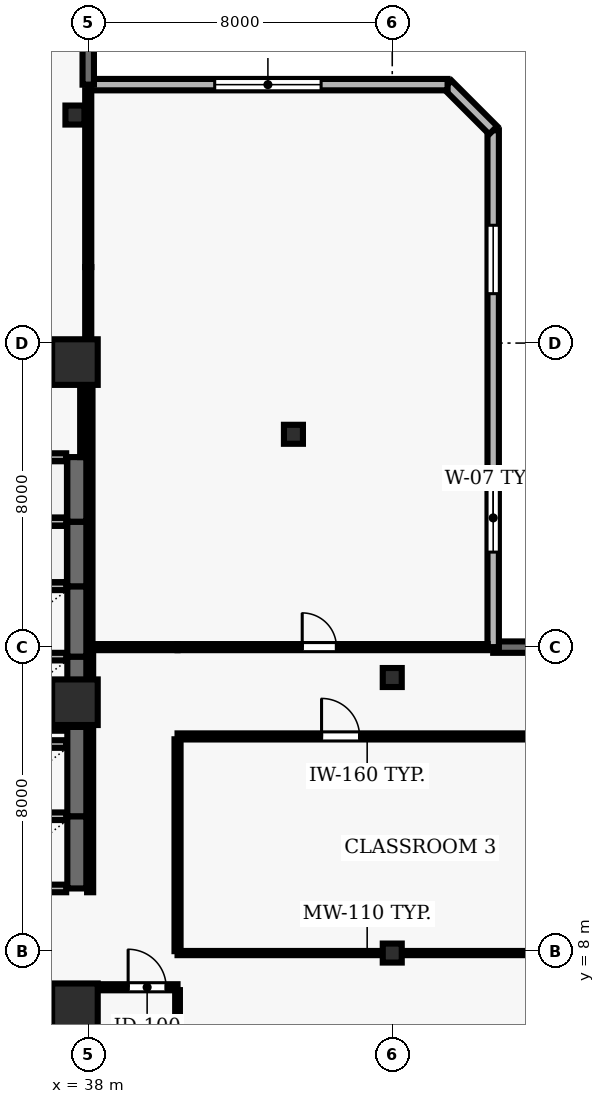
"""IFC4 building model, lengths in metres.
Left out: names, types, materials, properties, quantities, classifications, styles, units other than length and angle.
Written with IfcOpenShell. Run it as: python <this file> out.ifc"""

import sys

from ifc_helpers import new_model, si_unit, direction, frame, frame_2d, origin, origin_2d, place, context, subcontext, project, spatial, rectangle, hollow_rectangle, extrude, element, fill, save


model = new_model("IFC4")
c1 = context("Model", 3, precision=1e-05, world=origin(), true_north=direction((0.0, 1.0)))
c2 = subcontext(c1, "Body", "Model", "MODEL_VIEW")
j1 = project(units=[si_unit("LENGTHUNIT", "METRE"), si_unit("PLANEANGLEUNIT", "RADIAN")], contexts=[c1])
p1 = place(None, origin())
s1 = spatial("IfcSite", under=j1, at=p1, CompositionType="ELEMENT")
p2 = place(p1, origin())
s2 = spatial("IfcBuilding", under=s1, at=p2, CompositionType="ELEMENT")
p3 = place(p2, frame((0.0, 0.0, 107.3)))
s3 = spatial("IfcBuildingStorey", under=s2, at=p3, CompositionType="ELEMENT", Elevation=107.3)
for number, where, z_axis, x_axis in (
    (1, (37.65, 6.55, 0.0), (0.0, 0.0, 1.0), (1.0, 0.0, 0.0)),
    (2, (37.65, 14.55, 0.0), (0.0, 0.0, 1.0), (1.0, 0.0, 0.0)),
    (3, (37.65, 23.5, 0.0), (0.0, 0.0, 1.0), (1.0, 0.0, 0.0)),
):
    element("IfcColumn", number, at=place(p3, frame(where, z_axis=z_axis, x_axis=x_axis)), inside=s3, PredefinedType="COLUMN", context=c2, shape_type="SweptSolid", body=[
        extrude(rectangle(XDim=1.2, YDim=1.2, at=origin_2d()), origin(), (0.0, 0.0, 1.0), 3.9),
    ])
for number, where, z_axis, x_axis in (
    (4, (46.0, 7.95, 0.0), (0.0, 0.0, 1.0), (1.0, 0.0, 0.0)),
    (5, (46.0, 15.2, 0.0), (0.0, 0.0, 1.0), (1.0, 0.0, 0.0)),
    (6, (37.65, 30.0, 0.0), (0.0, 0.0, 1.0), (1.0, 0.0, 0.0)),
    (7, (43.4, 21.6, 0.0), (0.0, 0.0, 1.0), (1.0, 0.0, 0.0)),
):
    element("IfcColumn", number, at=place(p3, frame(where, z_axis=z_axis, x_axis=x_axis)), inside=s3, PredefinedType="COLUMN", context=c2, shape_type="SweptSolid", body=[
        extrude(hollow_rectangle(XDim=0.5, YDim=0.5, WallThickness=0.025, at=origin_2d()), origin(), (0.0, 0.0, 1.0), 3.9),
    ])
p4 = place(p3, frame((68.1, 16.0, 0.0), z_axis=(0.0, 0.0, 1.0), x_axis=(-1.0, 0.0, 0.0)))
e8 = element("IfcWall", 8, at=p4, inside=s3, PredefinedType="SOLIDWALL", context=c2, shape_type="SweptSolid", body=[
    extrude(rectangle(XDim=19.444, YDim=0.3, at=frame_2d((9.722, 0.0))), origin(), (0.0, 0.0, 1.0), 3.69),
])
p5 = place(p4, frame((6.922, 0.0, 0.0)))
e9 = element("IfcOpeningElement", 9, at=p5, cuts=e8, PredefinedType="OPENING", context=c2, shape_type="SweptSolid", body=[
    extrude(rectangle(XDim=1.0, YDim=2.2, at=frame_2d((0.5, 1.1))), frame((0.0, 0.16, 0.0), z_axis=(0.0, -1.0, 0.0), x_axis=(1.0, 0.0, 0.0)), (0.0, 0.0, 1.0), 0.32),
])
p6 = place(p4, frame((2.491, 0.0, 0.9)))
e10 = element("IfcOpeningElement", 10, at=p6, cuts=e8, PredefinedType="OPENING", context=c2, shape_type="SweptSolid", body=[
    extrude(rectangle(XDim=1.5, YDim=1.8, at=frame_2d((0.75, 0.9))), frame((0.0, 0.16, 0.0), z_axis=(0.0, -1.0, 0.0), x_axis=(1.0, 0.0, 0.0)), (0.0, 0.0, 1.0), 0.32),
])
p7 = place(p4, frame((8.972, 0.0, 0.9)))
e11 = element("IfcOpeningElement", 11, at=p7, cuts=e8, PredefinedType="OPENING", context=c2, shape_type="SweptSolid", body=[
    extrude(rectangle(XDim=1.5, YDim=1.8, at=frame_2d((0.75, 0.9))), frame((0.0, 0.16, 0.0), z_axis=(0.0, -1.0, 0.0), x_axis=(1.0, 0.0, 0.0)), (0.0, 0.0, 1.0), 0.32),
])
p8 = place(p4, frame((15.453, 0.0, 0.9)))
e12 = element("IfcOpeningElement", 12, at=p8, cuts=e8, PredefinedType="OPENING", context=c2, shape_type="SweptSolid", body=[
    extrude(rectangle(XDim=1.5, YDim=1.8, at=frame_2d((0.75, 0.9))), frame((0.0, 0.16, 0.0), z_axis=(0.0, -1.0, 0.0), x_axis=(1.0, 0.0, 0.0)), (0.0, 0.0, 1.0), 0.32),
])
p9 = place(p3, frame((48.656, 16.0, 0.0), z_axis=(0.0, 0.0, 1.0), x_axis=(0.0, 1.0, 0.0)))
e13 = element("IfcWall", 13, at=p9, inside=s3, PredefinedType="SOLIDWALL", context=c2, shape_type="SweptSolid", body=[
    extrude(rectangle(XDim=13.6, YDim=0.3, at=frame_2d((6.8, 0.0))), origin(), (0.0, 0.0, 1.0), 3.69),
])
p10 = place(p9, frame((2.5, 0.0, 0.9)))
e14 = element("IfcOpeningElement", 14, at=p10, cuts=e13, PredefinedType="OPENING", context=c2, shape_type="SweptSolid", body=[
    extrude(rectangle(XDim=1.8, YDim=1.8, at=frame_2d((0.9, 0.9))), frame((0.0, 0.16, 0.0), z_axis=(0.0, -1.0, 0.0), x_axis=(1.0, 0.0, 0.0)), (0.0, 0.0, 1.0), 0.32),
])
p11 = place(p9, frame((9.3, 0.0, 0.9)))
e15 = element("IfcOpeningElement", 15, at=p11, cuts=e13, PredefinedType="OPENING", context=c2, shape_type="SweptSolid", body=[
    extrude(rectangle(XDim=1.8, YDim=1.8, at=frame_2d((0.9, 0.9))), frame((0.0, 0.16, 0.0), z_axis=(0.0, -1.0, 0.0), x_axis=(1.0, 0.0, 0.0)), (0.0, 0.0, 1.0), 0.32),
])
p12 = place(p3, frame((48.656, 29.6, 0.0), z_axis=(0.0, 0.0, 1.0), x_axis=(-0.707106781187, 0.707106781187, 0.0)))
e16 = element("IfcWall", 16, at=p12, inside=s3, PredefinedType="SOLIDWALL", context=c2, shape_type="SweptSolid", body=[
    extrude(rectangle(XDim=1.697, YDim=0.3, at=frame_2d((0.849, 0.0))), origin(), (0.0, 0.0, 1.0), 3.69),
])
p13 = place(p3, frame((47.456, 30.8, 0.0), z_axis=(0.0, 0.0, 1.0), x_axis=(-1.0, 0.0, 0.0)))
e17 = element("IfcWall", 17, at=p13, inside=s3, PredefinedType="SOLIDWALL", context=c2, shape_type="SweptSolid", body=[
    extrude(rectangle(XDim=9.456, YDim=0.3, at=frame_2d((4.728, 0.0))), origin(), (0.0, 0.0, 1.0), 3.69),
])
p14 = place(p13, frame((3.328, 0.0, 0.9)))
e18 = element("IfcOpeningElement", 18, at=p14, cuts=e17, PredefinedType="OPENING", context=c2, shape_type="SweptSolid", body=[
    extrude(rectangle(XDim=2.8, YDim=1.8, at=frame_2d((1.4, 0.9))), frame((0.0, 0.16, 0.0), z_axis=(0.0, -1.0, 0.0), x_axis=(1.0, 0.0, 0.0)), (0.0, 0.0, 1.0), 0.32),
])
p15 = place(p3, frame((38.0, 30.8, 0.0), z_axis=(0.0, 0.0, 1.0), x_axis=(0.0, 1.0, 0.0)))
e19 = element("IfcWall", 19, at=p15, inside=s3, PredefinedType="SOLIDWALL", context=c2, shape_type="SweptSolid", body=[
    extrude(rectangle(XDim=15.3, YDim=0.3, at=frame_2d((7.65, 0.0))), origin(), (0.0, 0.0, 1.0), 3.69),
])
p16 = place(p15, frame((7.25, 0.0, 0.0)))
e20 = element("IfcOpeningElement", 20, at=p16, cuts=e19, PredefinedType="OPENING", context=c2, shape_type="SweptSolid", body=[
    extrude(rectangle(XDim=1.0, YDim=2.2, at=frame_2d((0.5, 1.1))), frame((0.0, 0.16, 0.0), z_axis=(0.0, -1.0, 0.0), x_axis=(1.0, 0.0, 0.0)), (0.0, 0.0, 1.0), 0.32),
])
p17 = place(p15, frame((2.475, 0.0, 0.9)))
e21 = element("IfcOpeningElement", 21, at=p17, cuts=e19, PredefinedType="OPENING", context=c2, shape_type="SweptSolid", body=[
    extrude(rectangle(XDim=1.8, YDim=2.2, at=frame_2d((0.9, 1.1))), frame((0.0, 0.16, 0.0), z_axis=(0.0, -1.0, 0.0), x_axis=(1.0, 0.0, 0.0)), (0.0, 0.0, 1.0), 0.32),
])
p18 = place(p15, frame((11.025, 0.0, 0.9)))
e22 = element("IfcOpeningElement", 22, at=p18, cuts=e19, PredefinedType="OPENING", context=c2, shape_type="SweptSolid", body=[
    extrude(rectangle(XDim=1.8, YDim=2.2, at=frame_2d((0.9, 1.1))), frame((0.0, 0.16, 0.0), z_axis=(0.0, -1.0, 0.0), x_axis=(1.0, 0.0, 0.0)), (0.0, 0.0, 1.0), 0.32),
])
p19 = place(p3, frame((37.7, 4.7, 0.0), z_axis=(0.0, 0.0, 1.0), x_axis=(0.0, 1.0, 0.0)))
e23 = element("IfcWall", 23, at=p19, inside=s3, PredefinedType="SHEAR", context=c2, shape_type="SweptSolid", body=[
    extrude(rectangle(XDim=2.25, YDim=0.5, at=frame_2d((1.125, 0.0))), origin(), (0.0, 0.0, 1.0), 3.69),
])
p20 = place(p3, frame((37.42, 6.95, 0.0), z_axis=(0.0, 0.0, 1.0), x_axis=(-1.0, 0.0, 0.0)))
e24 = element("IfcWall", 24, at=p20, inside=s3, PredefinedType="SOLIDWALL", context=c2, shape_type="SweptSolid", body=[
    extrude(rectangle(XDim=2.14, YDim=0.2, at=frame_2d((1.07, 0.0))), origin(), (0.0, 0.0, 1.0), 3.69),
])
p21 = place(p3, frame((37.7, 9.65, 0.0), z_axis=(0.0, 0.0, 1.0), x_axis=(0.0, 1.0, 0.0)))
e25 = element("IfcWall", 25, at=p21, inside=s3, PredefinedType="SHEAR", context=c2, shape_type="SweptSolid", body=[
    extrude(rectangle(XDim=1.9, YDim=0.5, at=frame_2d((0.95, 0.0))), origin(), (0.0, 0.0, 1.0), 3.69),
])
for number, where, z_axis, x_axis in (
    (26, (35.28, 9.65, 0.0), (0.0, 0.0, 1.0), (1.0, 0.0, 0.0)),
    (27, (37.42, 11.55, 0.0), (0.0, 0.0, 1.0), (-1.0, 0.0, 0.0)),
):
    element("IfcWall", number, at=place(p3, frame(where, z_axis=z_axis, x_axis=x_axis)), inside=s3, PredefinedType="SOLIDWALL", context=c2, shape_type="SweptSolid", body=[
        extrude(rectangle(XDim=2.14, YDim=0.2, at=frame_2d((1.07, 0.0))), origin(), (0.0, 0.0, 1.0), 3.69),
    ])
p22 = place(p3, frame((37.7, 11.55, 0.0), z_axis=(0.0, 0.0, 1.0), x_axis=(0.0, 1.0, 0.0)))
e28 = element("IfcWall", 28, at=p22, inside=s3, PredefinedType="SHEAR", context=c2, shape_type="SweptSolid", body=[
    extrude(rectangle(XDim=2.35, YDim=0.5, at=frame_2d((1.175, 0.0))), origin(), (0.0, 0.0, 1.0), 3.69),
])
p23 = place(p3, frame((37.42, 13.45, 0.0), z_axis=(0.0, 0.0, 1.0), x_axis=(-1.0, 0.0, 0.0)))
e29 = element("IfcWall", 29, at=p23, inside=s3, PredefinedType="SOLIDWALL", context=c2, shape_type="SweptSolid", body=[
    extrude(rectangle(XDim=2.14, YDim=0.2, at=frame_2d((1.07, 0.0))), origin(), (0.0, 0.0, 1.0), 3.69),
])
p24 = place(p3, frame((37.7, 13.9, 0.0), z_axis=(0.0, 0.0, 1.0), x_axis=(0.0, 1.0, 0.0)))
e30 = element("IfcWall", 30, at=p24, inside=s3, PredefinedType="SHEAR", context=c2, shape_type="SweptSolid", body=[
    extrude(rectangle(XDim=1.85, YDim=0.5, at=frame_2d((0.925, 0.0))), origin(), (0.0, 0.0, 1.0), 3.69),
])
for number, where, z_axis, x_axis in (
    (31, (35.28, 13.9, 0.0), (0.0, 0.0, 1.0), (1.0, 0.0, 0.0)),
    (32, (37.42, 15.75, 0.0), (0.0, 0.0, 1.0), (-1.0, 0.0, 0.0)),
):
    element("IfcWall", number, at=place(p3, frame(where, z_axis=z_axis, x_axis=x_axis)), inside=s3, PredefinedType="SOLIDWALL", context=c2, shape_type="SweptSolid", body=[
        extrude(rectangle(XDim=2.14, YDim=0.2, at=frame_2d((1.07, 0.0))), origin(), (0.0, 0.0, 1.0), 3.69),
    ])
p25 = place(p3, frame((37.7, 15.75, 0.0), z_axis=(0.0, 0.0, 1.0), x_axis=(0.0, 1.0, 0.0)))
e33 = element("IfcWall", 33, at=p25, inside=s3, PredefinedType="SHEAR", context=c2, shape_type="SweptSolid", body=[
    extrude(rectangle(XDim=1.85, YDim=0.5, at=frame_2d((0.925, 0.0))), origin(), (0.0, 0.0, 1.0), 3.69),
])
p26 = place(p3, frame((37.42, 17.6, 0.0), z_axis=(0.0, 0.0, 1.0), x_axis=(-1.0, 0.0, 0.0)))
e34 = element("IfcWall", 34, at=p26, inside=s3, PredefinedType="SOLIDWALL", context=c2, shape_type="SweptSolid", body=[
    extrude(rectangle(XDim=2.14, YDim=0.2, at=frame_2d((1.07, 0.0))), origin(), (0.0, 0.0, 1.0), 3.69),
])
p27 = place(p3, frame((37.7, 17.6, 0.0), z_axis=(0.0, 0.0, 1.0), x_axis=(0.0, 1.0, 0.0)))
e35 = element("IfcWall", 35, at=p27, inside=s3, PredefinedType="SHEAR", context=c2, shape_type="SweptSolid", body=[
    extrude(rectangle(XDim=1.7, YDim=0.5, at=frame_2d((0.85, 0.0))), origin(), (0.0, 0.0, 1.0), 3.69),
])
p28 = place(p3, frame((37.42, 19.3, 0.0), z_axis=(0.0, 0.0, 1.0), x_axis=(-1.0, 0.0, 0.0)))
e36 = element("IfcWall", 36, at=p28, inside=s3, PredefinedType="SOLIDWALL", context=c2, shape_type="SweptSolid", body=[
    extrude(rectangle(XDim=2.14, YDim=0.2, at=frame_2d((1.07, 0.0))), origin(), (0.0, 0.0, 1.0), 3.69),
])
p29 = place(p3, frame((37.7, 19.3, 0.0), z_axis=(0.0, 0.0, 1.0), x_axis=(0.0, 1.0, 0.0)))
e37 = element("IfcWall", 37, at=p29, inside=s3, PredefinedType="SHEAR", context=c2, shape_type="SweptSolid", body=[
    extrude(rectangle(XDim=1.7, YDim=0.5, at=frame_2d((0.85, 0.0))), origin(), (0.0, 0.0, 1.0), 3.69),
])
p30 = place(p3, frame((37.42, 21.0, 0.0), z_axis=(0.0, 0.0, 1.0), x_axis=(-1.0, 0.0, 0.0)))
e38 = element("IfcWall", 38, at=p30, inside=s3, PredefinedType="SOLIDWALL", context=c2, shape_type="SweptSolid", body=[
    extrude(rectangle(XDim=2.14, YDim=0.2, at=frame_2d((1.07, 0.0))), origin(), (0.0, 0.0, 1.0), 3.69),
])
p31 = place(p3, frame((37.85, 23.85, 0.0), z_axis=(0.0, 0.0, 1.0), x_axis=(-1.0, 0.0, 0.0)))
e39 = element("IfcWall", 39, at=p31, inside=s3, PredefinedType="PARTITIONING", context=c2, shape_type="SweptSolid", body=[
    extrude(rectangle(XDim=2.0, YDim=0.16, at=frame_2d((1.0, 0.0))), origin(), (0.0, 0.0, 1.0), 3.073),
])
p32 = place(p3, frame((38.05, 7.05, 0.0), z_axis=(0.0, 0.0, 1.0), x_axis=(1.0, 0.0, 0.0)))
e40 = element("IfcWall", 40, at=p32, inside=s3, PredefinedType="PARTITIONING", context=c2, shape_type="SweptSolid", body=[
    extrude(rectangle(XDim=2.3, YDim=0.16, at=frame_2d((1.15, 0.0))), origin(), (0.0, 0.0, 1.0), 3.69),
])
p33 = place(p32, frame((1.0, 0.0, 0.0)))
e41 = element("IfcOpeningElement", 41, at=p33, cuts=e40, PredefinedType="OPENING", context=c2, shape_type="SweptSolid", body=[
    extrude(rectangle(XDim=1.0, YDim=2.1, at=frame_2d((0.5, 1.05))), frame((0.0, 0.09, 0.0), z_axis=(0.0, -1.0, 0.0), x_axis=(1.0, 0.0, 0.0)), (0.0, 0.0, 1.0), 0.18),
])
p34 = place(p3, frame((40.35, 13.65, 0.0), z_axis=(0.0, 0.0, 1.0), x_axis=(1.0, 0.0, 0.0)))
e42 = element("IfcWall", 42, at=p34, inside=s3, PredefinedType="PARTITIONING", context=c2, shape_type="SweptSolid", body=[
    extrude(rectangle(XDim=9.98, YDim=0.16, at=frame_2d((4.99, 0.0))), origin(), (0.0, 0.0, 1.0), 3.69),
])
p35 = place(p34, frame((3.79, 0.0, 0.0)))
e43 = element("IfcOpeningElement", 43, at=p35, cuts=e42, PredefinedType="OPENING", context=c2, shape_type="SweptSolid", body=[
    extrude(rectangle(XDim=1.0, YDim=2.1, at=frame_2d((0.5, 1.05))), frame((0.0, 0.09, 0.0), z_axis=(0.0, -1.0, 0.0), x_axis=(1.0, 0.0, 0.0)), (0.0, 0.0, 1.0), 0.18),
])
p36 = place(p3, frame((40.35, 16.0, 0.0), z_axis=(0.0, 0.0, 1.0), x_axis=(-1.0, 0.0, 0.0)))
e44 = element("IfcWall", 44, at=p36, inside=s3, PredefinedType="PARTITIONING", context=c2, shape_type="SweptSolid", body=[
    extrude(rectangle(XDim=2.3, YDim=0.16, at=frame_2d((1.15, 0.0))), origin(), (0.0, 0.0, 1.0), 3.69),
])
p37 = place(p3, frame((40.35, 16.0, 0.0), z_axis=(0.0, 0.0, 1.0), x_axis=(1.0, 0.0, 0.0)))
e45 = element("IfcWall", 45, at=p37, inside=s3, PredefinedType="PARTITIONING", context=c2, shape_type="SweptSolid", body=[
    extrude(rectangle(XDim=8.161, YDim=0.16, at=frame_2d((4.081, 0.0))), origin(), (0.0, 0.0, 1.0), 3.69),
])
p38 = place(p37, frame((3.281, 0.0, 0.0)))
e46 = element("IfcOpeningElement", 46, at=p38, cuts=e45, PredefinedType="OPENING", context=c2, shape_type="SweptSolid", body=[
    extrude(rectangle(XDim=0.9, YDim=2.1, at=frame_2d((0.45, 1.05))), frame((0.0, 0.09, 0.0), z_axis=(0.0, -1.0, 0.0), x_axis=(1.0, 0.0, 0.0)), (0.0, 0.0, 1.0), 0.18),
])
p39 = place(p3, frame((50.33, 7.95, 0.0), z_axis=(0.0, 0.0, 1.0), x_axis=(-1.0, 0.0, 0.0)))
e47 = element("IfcWall", 47, at=p39, inside=s3, PredefinedType="MOVABLE", context=c2, shape_type="SweptSolid", body=[
    extrude(rectangle(XDim=9.98, YDim=0.11, at=frame_2d((4.99, 0.0))), origin(), (0.0, 0.0, 1.0), 3.073),
])
p40 = place(p3, frame((37.85, 21.0, 0.0), z_axis=(0.0, 0.0, 1.0), x_axis=(0.0, 1.0, 0.0)))
e48 = element("IfcWall", 48, at=p40, inside=s3, PredefinedType="PARTITIONING", context=c2, shape_type="SweptSolid", body=[
    extrude(rectangle(XDim=2.775, YDim=0.125, at=frame_2d((1.387, 0.0))), origin(), (0.0, 0.0, 1.0), 3.073),
])
p41 = place(p3, frame((38.0, 23.85, 0.0), z_axis=(0.0, 0.0, 1.0), x_axis=(0.0, 1.0, 0.0)))
e49 = element("IfcWall", 49, at=p41, inside=s3, PredefinedType="PARTITIONING", context=c2, shape_type="SweptSolid", body=[
    extrude(rectangle(XDim=2.15, YDim=0.16, at=frame_2d((1.075, 0.0))), origin(), (0.0, 0.0, 1.0), 3.073),
])
p42 = place(p3, frame((38.0, 26.0, 0.0), z_axis=(0.0, 0.0, 1.0), x_axis=(0.0, 1.0, 0.0)))
e50 = element("IfcWall", 50, at=p42, inside=s3, PredefinedType="PARTITIONING", context=c2, shape_type="SweptSolid", body=[
    extrude(rectangle(XDim=4.655, YDim=0.16, at=frame_2d((2.328, 0.0))), origin(), (0.0, 0.0, 1.0), 3.073),
])
p43 = place(p3, frame((38.05, 6.975, 0.0), z_axis=(0.0, 0.0, 1.0), x_axis=(0.0, -1.0, 0.0)))
e51 = element("IfcWall", 51, at=p43, inside=s3, PredefinedType="PARTITIONING", context=c2, shape_type="SweptSolid", body=[
    extrude(rectangle(XDim=6.83, YDim=0.125, at=frame_2d((3.415, 0.0))), origin(), (0.0, 0.0, 1.0), 3.073),
])
p44 = place(p3, frame((38.05, 15.925, 0.0), z_axis=(0.0, 0.0, 1.0), x_axis=(0.0, -1.0, 0.0)))
e52 = element("IfcWall", 52, at=p44, inside=s3, PredefinedType="PARTITIONING", context=c2, shape_type="SweptSolid", body=[
    extrude(rectangle(XDim=6.375, YDim=0.16, at=frame_2d((3.188, 0.0))), origin(), (0.0, 0.0, 1.0), 3.073),
])
p45 = place(p3, frame((38.05, 23.85, 0.0), z_axis=(0.0, 0.0, 1.0), x_axis=(0.0, -1.0, 0.0)))
e53 = element("IfcWall", 53, at=p45, inside=s3, PredefinedType="PARTITIONING", context=c2, shape_type="SweptSolid", body=[
    extrude(rectangle(XDim=7.775, YDim=0.125, at=frame_2d((3.888, 0.0))), origin(), (0.0, 0.0, 1.0), 3.073),
])
p46 = place(p3, frame((40.35, 0.145, 0.0), z_axis=(0.0, 0.0, 1.0), x_axis=(0.0, 1.0, 0.0)))
e54 = element("IfcWall", 54, at=p46, inside=s3, PredefinedType="PARTITIONING", context=c2, shape_type="SweptSolid", body=[
    extrude(rectangle(XDim=6.83, YDim=0.125, at=frame_2d((3.415, 0.0))), origin(), (0.0, 0.0, 1.0), 3.69),
])
p47 = place(p46, frame((2.965, 0.0, 0.0)))
e55 = element("IfcOpeningElement", 55, at=p47, cuts=e54, PredefinedType="OPENING", context=c2, shape_type="SweptSolid", body=[
    extrude(rectangle(XDim=0.9, YDim=2.1, at=frame_2d((0.45, 1.05))), frame((0.0, 0.073, 0.0), z_axis=(0.0, -1.0, 0.0), x_axis=(1.0, 0.0, 0.0)), (0.0, 0.0, 1.0), 0.145),
])
p48 = place(p3, frame((40.35, 8.0, 0.0), z_axis=(0.0, 0.0, 1.0), x_axis=(0.0, 1.0, 0.0)))
e56 = element("IfcWall", 56, at=p48, inside=s3, PredefinedType="PARTITIONING", context=c2, shape_type="SweptSolid", body=[
    extrude(rectangle(XDim=5.575, YDim=0.16, at=frame_2d((2.788, 0.0))), origin(), (0.0, 0.0, 1.0), 3.69),
])
p49 = place(p10, origin())
e57 = element("IfcWindow", 57, at=p49, inside=s3, PartitioningType="SINGLE_PANEL", PredefinedType="WINDOW", context=c2, shape_type="SweptSolid", body=[
    extrude(rectangle(XDim=1.8, YDim=1.8, at=frame_2d((0.9, 0.9))), frame((0.0, 0.03, 0.0), z_axis=(0.0, -1.0, 0.0), x_axis=(1.0, 0.0, 0.0)), (0.0, 0.0, 1.0), 0.06),
])
fill(e14, e57)
p50 = place(p11, origin())
e58 = element("IfcWindow", 58, at=p50, inside=s3, PartitioningType="SINGLE_PANEL", PredefinedType="WINDOW", context=c2, shape_type="SweptSolid", body=[
    extrude(rectangle(XDim=1.8, YDim=1.8, at=frame_2d((0.9, 0.9))), frame((0.0, 0.03, 0.0), z_axis=(0.0, -1.0, 0.0), x_axis=(1.0, 0.0, 0.0)), (0.0, 0.0, 1.0), 0.06),
])
fill(e15, e58)
p51 = place(p14, origin())
e59 = element("IfcWindow", 59, at=p51, inside=s3, PartitioningType="SINGLE_PANEL", PredefinedType="WINDOW", context=c2, shape_type="SweptSolid", body=[
    extrude(rectangle(XDim=2.8, YDim=1.8, at=frame_2d((1.4, 0.9))), frame((0.0, 0.03, 0.0), z_axis=(0.0, -1.0, 0.0), x_axis=(1.0, 0.0, 0.0)), (0.0, 0.0, 1.0), 0.06),
])
fill(e18, e59)
p52 = place(p33, origin())
e60 = element("IfcDoor", 60, at=p52, inside=s3, OperationType="SINGLE_SWING_LEFT", PredefinedType="DOOR", context=c2, shape_type="SweptSolid", body=[
    extrude(rectangle(XDim=1.0, YDim=2.1, at=frame_2d((0.5, 1.05))), frame((0.0, 0.025, 0.0), z_axis=(0.0, -1.0, 0.0), x_axis=(1.0, 0.0, 0.0)), (0.0, 0.0, 1.0), 0.05),
])
fill(e41, e60)
p53 = place(p35, origin())
e61 = element("IfcDoor", 61, at=p53, inside=s3, OperationType="SINGLE_SWING_LEFT", PredefinedType="DOOR", context=c2, shape_type="SweptSolid", body=[
    extrude(rectangle(XDim=1.0, YDim=2.1, at=frame_2d((0.5, 1.05))), frame((0.0, 0.025, 0.0), z_axis=(0.0, -1.0, 0.0), x_axis=(1.0, 0.0, 0.0)), (0.0, 0.0, 1.0), 0.05),
])
fill(e43, e61)
p54 = place(p38, origin())
e62 = element("IfcDoor", 62, at=p54, inside=s3, OperationType="SINGLE_SWING_LEFT", PredefinedType="DOOR", context=c2, shape_type="SweptSolid", body=[
    extrude(rectangle(XDim=0.9, YDim=2.1, at=frame_2d((0.45, 1.05))), frame((0.0, 0.025, 0.0), z_axis=(0.0, -1.0, 0.0), x_axis=(1.0, 0.0, 0.0)), (0.0, 0.0, 1.0), 0.05),
])
fill(e46, e62)
save(model, sys.argv[1])
